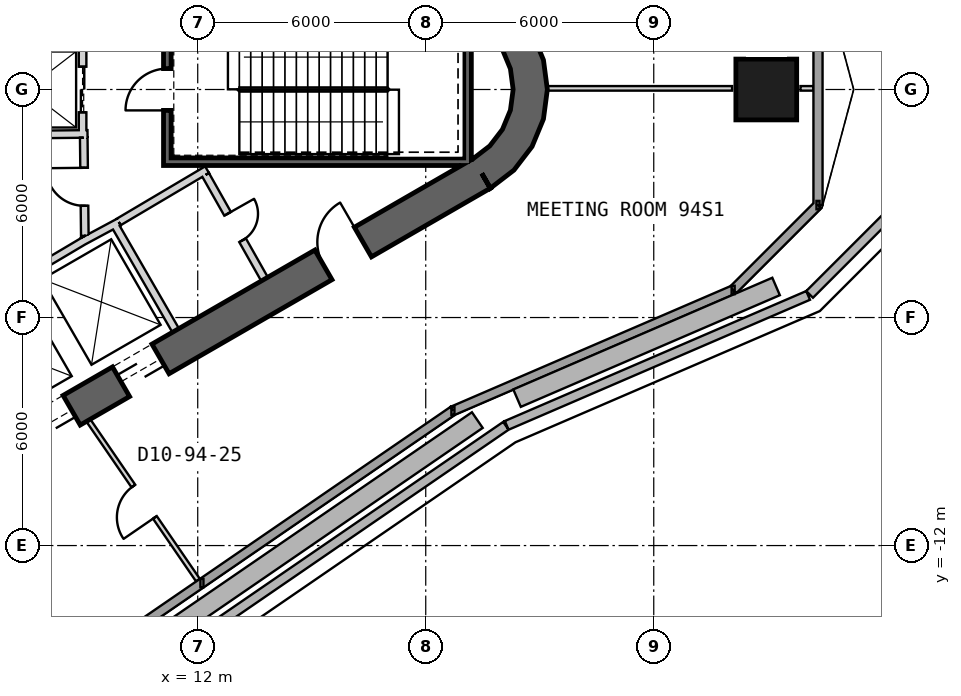
"""IFC4 building model, lengths in metres.
Left out: names, types, materials, properties, quantities, classifications, styles, units other than length and angle.
Written with IfcOpenShell. Run it as: python <this file> out.ifc"""

import sys

from ifc_helpers import new_model, si_unit, direction, frame, frame_2d, origin, origin_2d, place, context, subcontext, project, spatial, polyline, rectangle, outline, extrude, element, fill, save


model = new_model("IFC4")
c1 = context("Model", 3, precision=1e-05, world=origin(), true_north=direction((0.0, 1.0)))
c2 = subcontext(c1, "Body", "Model", "MODEL_VIEW")
j1 = project(units=[si_unit("LENGTHUNIT", "METRE"), si_unit("PLANEANGLEUNIT", "RADIAN")], contexts=[c1])
p1 = place(None, origin())
s1 = spatial("IfcSite", under=j1, at=p1, CompositionType="ELEMENT")
p2 = place(p1, origin())
s2 = spatial("IfcBuilding", under=s1, at=p2, CompositionType="ELEMENT")
p3 = place(p2, frame((0.0, 0.0, 415.3)))
s3 = spatial("IfcBuildingStorey", under=s2, at=p3, CompositionType="ELEMENT", Elevation=415.3)
p4 = place(p3, frame((26.961, 0.0, -0.25), z_axis=(0.0, 0.0, 1.0), x_axis=(1.0, 0.0, 0.0)))
e1 = element("IfcColumn", 1, at=p4, inside=s3, PredefinedType="COLUMN", context=c2, shape_type="SweptSolid", body=[
    extrude(rectangle(XDim=1.6, YDim=1.6, at=origin_2d()), origin(), (0.0, 0.0, 1.0), 5.0),
])
p5 = place(p3, frame((-7.825, -17.97, 0.0), z_axis=(0.0, 0.0, 1.0), x_axis=(0.866028369851, 0.499994862586, 0.0)))
e2 = element("IfcWall", 2, at=p5, inside=s3, PredefinedType="SHEAR", context=c2, shape_type="SweptSolid", body=[
    extrude(rectangle(XDim=31.523, YDim=0.9, at=frame_2d((15.762, 0.0))), origin(), (0.0, 0.0, 1.0), 5.0),
])
p6 = place(p5, frame((17.862, 0.0, 0.0)))
e3 = element("IfcOpeningElement", 3, at=p6, cuts=e2, PredefinedType="OPENING", context=c2, shape_type="SweptSolid", body=[
    extrude(rectangle(XDim=1.2, YDim=2.4, at=frame_2d((0.6, 1.2))), frame((0.0, 0.46, 0.0), z_axis=(0.0, -1.0, 0.0), x_axis=(1.0, 0.0, 0.0)), (0.0, 0.0, 1.0), 0.92),
])
p7 = place(p5, frame((20.562, 0.0, 0.0)))
e4 = element("IfcOpeningElement", 4, at=p7, cuts=e2, PredefinedType="OPENING", context=c2, shape_type="SweptSolid", body=[
    extrude(rectangle(XDim=1.2, YDim=2.4, at=frame_2d((0.6, 1.2))), frame((0.0, 0.46, 0.0), z_axis=(0.0, -1.0, 0.0), x_axis=(1.0, 0.0, 0.0)), (0.0, 0.0, 1.0), 0.92),
])
p8 = place(p5, frame((26.712, 0.0, 0.0)))
e5 = element("IfcOpeningElement", 5, at=p8, cuts=e2, PredefinedType="OPENING", context=c2, shape_type="SweptSolid", body=[
    extrude(rectangle(XDim=1.2, YDim=2.4, at=frame_2d((0.6, 1.2))), frame((0.0, 0.46, 0.0), z_axis=(0.0, -1.0, 0.0), x_axis=(1.0, 0.0, 0.0)), (0.0, 0.0, 1.0), 0.92),
])
p9 = place(p5, frame((3.612, 0.0, 0.0)))
e6 = element("IfcOpeningElement", 6, at=p9, cuts=e2, PredefinedType="OPENING", context=c2, shape_type="SweptSolid", body=[
    extrude(rectangle(XDim=1.2, YDim=2.4, at=frame_2d((0.6, 1.2))), frame((0.0, 0.46, 0.0), z_axis=(0.0, -1.0, 0.0), x_axis=(1.0, 0.0, 0.0)), (0.0, 0.0, 1.0), 0.92),
])
p10 = place(p3, origin())
e7 = element("IfcWall", 7, at=p10, inside=s3, PredefinedType="SHEAR", context=c2, shape_type="SweptSolid", body=[
    extrude(outline(polyline([(19.7, -2.598), (20.321, -2.121), (20.798, -1.5), (21.098, -0.777), (21.2, 0.0), (21.098, 0.777), (20.798, 1.5), (20.321, 2.121), (19.7, 2.598), (19.25, 1.819), (19.685, 1.485), (20.019, 1.05), (20.229, 0.543), (20.3, 0.0), (20.229, -0.543), (20.019, -1.05), (19.685, -1.485), (19.25, -1.819), (19.7, -2.598)])), origin(), (0.0, 0.0, 1.0), 5.0),
])
p11 = place(p3, frame((-1.098, -22.052, 0.0), z_axis=(0.0, 0.0, 1.0), x_axis=(0.824476827337, 0.565895715821, 0.0)))
e8 = element("IfcWall", 8, at=p11, inside=s3, PredefinedType="SOLIDWALL", context=c2, shape_type="SweptSolid", body=[
    extrude(rectangle(XDim=24.031, YDim=0.24, at=frame_2d((12.016, 0.0))), origin(), (0.0, 0.0, 1.0), 4.75),
])
p12 = place(p3, frame((18.716, -8.453, 0.0), z_axis=(0.0, 0.0, 1.0), x_axis=(0.91830312374, 0.395877977323, 0.0)))
e9 = element("IfcWall", 9, at=p12, inside=s3, PredefinedType="SOLIDWALL", context=c2, shape_type="SweptSolid", body=[
    extrude(rectangle(XDim=8.03, YDim=0.24, at=frame_2d((4.015, 0.0))), origin(), (0.0, 0.0, 1.0), 4.75),
])
p13 = place(p3, frame((26.089, -5.274, 0.0), z_axis=(0.0, 0.0, 1.0), x_axis=(0.707106781187, 0.707106781187, 0.0)))
e10 = element("IfcWall", 10, at=p13, inside=s3, PredefinedType="SOLIDWALL", context=c2, shape_type="SweptSolid", body=[
    extrude(rectangle(XDim=3.158, YDim=0.24, at=frame_2d((1.579, 0.0))), origin(), (0.0, 0.0, 1.0), 4.75),
])
p14 = place(p3, frame((28.322, -3.041, 0.0), z_axis=(0.0, 0.0, 1.0), x_axis=(0.0, 1.0, 0.0)))
e11 = element("IfcWall", 11, at=p14, inside=s3, PredefinedType="SOLIDWALL", context=c2, shape_type="SweptSolid", body=[
    extrude(rectangle(XDim=6.083, YDim=0.24, at=frame_2d((3.041, 0.0))), origin(), (0.0, 0.0, 1.0), 4.75),
])
p15 = place(p3, frame((30.362, -3.131, 0.04), z_axis=(0.0, 0.0, 1.0), x_axis=(-0.707144954684, -0.707068605628, 0.0)))
e12 = element("IfcWall", 12, at=p15, inside=s3, PredefinedType="PARAPET", context=c2, shape_type="SweptSolid", body=[
    extrude(rectangle(XDim=3.198, YDim=0.25, at=frame_2d((1.599, 0.0))), origin(), (0.0, 0.0, 1.0), 1.2),
])
p16 = place(p3, frame((28.062, -5.418, 0.04), z_axis=(0.0, 0.0, 1.0), x_axis=(-0.918306725868, -0.395869621499, 0.0)))
e13 = element("IfcWall", 13, at=p16, inside=s3, PredefinedType="PARAPET", context=c2, shape_type="SweptSolid", body=[
    extrude(rectangle(XDim=8.638, YDim=0.25, at=frame_2d((4.319, 0.0))), origin(), (0.0, 0.0, 1.0), 1.2),
])
p17 = place(p3, frame((20.109, -8.849, 0.04), z_axis=(0.0, 0.0, 1.0), x_axis=(-0.824476642241, -0.565895985494, 0.0)))
e14 = element("IfcWall", 14, at=p17, inside=s3, PredefinedType="PARAPET", context=c2, shape_type="SweptSolid", body=[
    extrude(rectangle(XDim=26.04, YDim=0.25, at=frame_2d((13.02, 0.0))), origin(), (0.0, 0.0, 1.0), 1.2),
])
p18 = place(p3, frame((27.219, -5.183, 0.04), z_axis=(0.0, 0.0, 1.0), x_axis=(-0.918307593702, -0.39586760836, 0.0)))
e15 = element("IfcWall", 15, at=p18, inside=s3, PredefinedType="PARAPET", context=c2, shape_type="SweptSolid", body=[
    extrude(rectangle(XDim=7.422, YDim=0.5, at=frame_2d((3.711, 0.0))), origin(), (0.0, 0.0, 1.0), 0.6),
])
p19 = place(p3, frame((19.357, -8.698, 0.04), z_axis=(0.0, 0.0, 1.0), x_axis=(-0.824477152259, -0.565895242428, 0.0)))
e16 = element("IfcWall", 16, at=p19, inside=s3, PredefinedType="PARAPET", context=c2, shape_type="SweptSolid", body=[
    extrude(rectangle(XDim=24.864, YDim=0.5, at=frame_2d((12.432, 0.0))), origin(), (0.0, 0.0, 1.0), 0.6),
])
p20 = place(p3, frame((9.795, -3.525, 0.0), z_axis=(0.0, 0.0, 1.0), x_axis=(0.499984717929, -0.866034226713, 0.0)))
e17 = element("IfcWall", 17, at=p20, inside=s3, PredefinedType="PLUMBINGWALL", context=c2, shape_type="SweptSolid", body=[
    extrude(rectangle(XDim=3.25, YDim=0.2, at=frame_2d((1.625, 0.0))), origin(), (0.0, 0.0, 1.0), 4.75),
])
p21 = place(p3, frame((8.974, -3.999, 0.0), z_axis=(0.0, 0.0, 1.0), x_axis=(0.880907015104, 0.473289373154, 0.0)))
e18 = element("IfcWall", 18, at=p21, inside=s3, PredefinedType="PLUMBINGWALL", context=c2, shape_type="SweptSolid", body=[
    extrude(rectangle(XDim=1.078, YDim=0.2, at=frame_2d((0.539, 0.0))), origin(), (0.0, 0.0, 1.0), 4.75),
])
p22 = place(p3, frame((7.493, -4.878, 0.0), z_axis=(0.0, 0.0, 1.0), x_axis=(0.859981807212, 0.510324691999, 0.0)))
e19 = element("IfcWall", 19, at=p22, inside=s3, PredefinedType="PLUMBINGWALL", context=c2, shape_type="SweptSolid", body=[
    extrude(rectangle(XDim=1.845, YDim=0.2, at=frame_2d((0.922, 0.0))), origin(), (0.0, 0.0, 1.0), 4.75),
])
p23 = place(p3, frame((19.1, -2.0, -0.25), z_axis=(0.0, 0.0, 1.0), x_axis=(0.0, 1.0, 0.0)))
e20 = element("IfcWall", 20, at=p23, inside=s3, PredefinedType="SHEAR", context=c2, shape_type="SweptSolid", body=[
    extrude(rectangle(XDim=3.8, YDim=0.2, at=frame_2d((1.9, 0.0))), origin(), (0.0, 0.0, 1.0), 5.0),
])
p24 = place(p3, frame((11.1, -1.9, -0.25), z_axis=(0.0, 0.0, 1.0), x_axis=(1.0, 0.0, 0.0)))
e21 = element("IfcWall", 21, at=p24, inside=s3, PredefinedType="SHEAR", context=c2, shape_type="SweptSolid", body=[
    extrude(rectangle(XDim=7.9, YDim=0.2, at=frame_2d((3.95, 0.0))), origin(), (0.0, 0.0, 1.0), 5.0),
])
p25 = place(p3, frame((11.2, -1.8, -0.25), z_axis=(0.0, 0.0, 1.0), x_axis=(0.0, 1.0, 0.0)))
e22 = element("IfcWall", 22, at=p25, inside=s3, PredefinedType="SHEAR", context=c2, shape_type="SweptSolid", body=[
    extrude(rectangle(XDim=3.6, YDim=0.2, at=frame_2d((1.8, 0.0))), origin(), (0.0, 0.0, 1.0), 5.0),
])
p26 = place(p25, frame((1.25, 0.0, 0.25)))
e23 = element("IfcOpeningElement", 23, at=p26, cuts=e22, PredefinedType="OPENING", context=c2, shape_type="SweptSolid", body=[
    extrude(rectangle(XDim=1.1, YDim=2.1, at=frame_2d((0.55, 1.05))), frame((0.0, 0.11, 0.0), z_axis=(0.0, -1.0, 0.0), x_axis=(1.0, 0.0, 0.0)), (0.0, 0.0, 1.0), 0.22),
])
p27 = place(p3, frame((8.97, 1.2, 0.0), z_axis=(0.0, 0.0, 1.0), x_axis=(0.0, -1.0, 0.0)))
e24 = element("IfcWall", 24, at=p27, inside=s3, PredefinedType="PLUMBINGWALL", context=c2, shape_type="SweptSolid", body=[
    extrude(rectangle(XDim=2.4, YDim=0.2, at=frame_2d((1.2, 0.0))), origin(), (0.0, 0.0, 1.0), 4.75),
])
p28 = place(p27, frame((0.6, 0.0, 0.0)))
e25 = element("IfcOpeningElement", 25, at=p28, cuts=e24, PredefinedType="OPENING", context=c2, shape_type="SweptSolid", body=[
    extrude(rectangle(XDim=1.2, YDim=2.4, at=frame_2d((0.6, 1.2))), frame((0.0, 0.11, 0.0), z_axis=(0.0, -1.0, 0.0), x_axis=(1.0, 0.0, 0.0)), (0.0, 0.0, 1.0), 0.22),
])
p29 = place(p3, frame((5.9, -1.201, 0.0), z_axis=(0.0, 0.0, 1.0), x_axis=(0.999950064753, 0.009993397809, 0.0)))
e26 = element("IfcWall", 26, at=p29, inside=s3, PredefinedType="PLUMBINGWALL", context=c2, shape_type="SweptSolid", body=[
    extrude(rectangle(XDim=3.2, YDim=0.2, at=frame_2d((1.6, 0.0))), origin(), (0.0, 0.0, 1.0), 4.75),
])
p30 = place(p3, frame((12.245, -2.109, 0.0), z_axis=(0.0, 0.0, 1.0), x_axis=(-0.860414880418, -0.509594185166, 0.0)))
e27 = element("IfcWall", 27, at=p30, inside=s3, PredefinedType="PARTITIONING", context=c2, shape_type="SweptSolid", body=[
    extrude(rectangle(XDim=2.7, YDim=0.2, at=frame_2d((1.35, 0.0))), origin(), (0.0, 0.0, 1.0), 4.75),
])
p31 = place(p3, frame((13.758, -4.99, 0.0), z_axis=(0.0, 0.0, 1.0), x_axis=(-0.491993409184, 0.87059892334, 0.0)))
e28 = element("IfcWall", 28, at=p31, inside=s3, PredefinedType="PARTITIONING", context=c2, shape_type="SweptSolid", body=[
    extrude(rectangle(XDim=3.15, YDim=0.2, at=frame_2d((1.575, 0.0))), origin(), (0.0, 0.0, 1.0), 4.75),
])
p32 = place(p31, frame((1.175, 0.0, 0.0)))
e29 = element("IfcOpeningElement", 29, at=p32, cuts=e28, PredefinedType="OPENING", context=c2, shape_type="SweptSolid", body=[
    extrude(rectangle(XDim=0.8, YDim=2.1, at=frame_2d((0.4, 1.05))), frame((0.0, 0.11, 0.0), z_axis=(0.0, -1.0, 0.0), x_axis=(1.0, 0.0, 0.0)), (0.0, 0.0, 1.0), 0.22),
])
p33 = place(p3, frame((9.029, -3.851, 0.0), z_axis=(0.0, 0.0, 1.0), x_axis=(-0.010783593937, 0.99994185536, 0.0)))
e30 = element("IfcWall", 30, at=p33, inside=s3, PredefinedType="PARTITIONING", context=c2, shape_type="SweptSolid", body=[
    extrude(rectangle(XDim=2.581, YDim=0.2, at=frame_2d((1.291, 0.0))), origin(), (0.0, 0.0, 1.0), 4.75),
])
p34 = place(p33, frame((0.791, 0.0, 0.0)))
e31 = element("IfcOpeningElement", 31, at=p34, cuts=e30, PredefinedType="OPENING", context=c2, shape_type="SweptSolid", body=[
    extrude(rectangle(XDim=1.0, YDim=2.1, at=frame_2d((0.5, 1.05))), frame((0.0, 0.11, 0.0), z_axis=(0.0, -1.0, 0.0), x_axis=(1.0, 0.0, 0.0)), (0.0, 0.0, 1.0), 0.22),
])
p35 = place(p3, frame((21.046, 0.03, 0.0), z_axis=(0.0, 0.0, 1.0), x_axis=(1.0, 0.0, 0.0)))
e32 = element("IfcWall", 32, at=p35, inside=s3, PredefinedType="PARTITIONING", context=c2, shape_type="SweptSolid", body=[
    extrude(rectangle(XDim=5.015, YDim=0.12, at=frame_2d((2.507, 0.0))), origin(), (0.0, 0.0, 1.0), 2.52),
])
p36 = place(p3, frame((27.861, 0.03, 0.0), z_axis=(0.0, 0.0, 1.0), x_axis=(1.0, 0.0, 0.0)))
e33 = element("IfcWall", 33, at=p36, inside=s3, PredefinedType="PARTITIONING", context=c2, shape_type="SweptSolid", body=[
    extrude(rectangle(XDim=0.341, YDim=0.12, at=frame_2d((0.17, 0.0))), origin(), (0.0, 0.0, 1.0), 4.75),
])
p37 = place(p3, frame((12.004, -12.907, 0.0), z_axis=(0.0, 0.0, 1.0), x_axis=(-0.565849521663, 0.824508531693, 0.0)))
e34 = element("IfcWall", 34, at=p37, inside=s3, PredefinedType="PARTITIONING", context=c2, shape_type="SweptSolid", body=[
    extrude(rectangle(XDim=5.096, YDim=0.12, at=frame_2d((2.548, 0.0))), origin(), (0.0, 0.0, 1.0), 4.75),
])
p38 = place(p37, frame((2.0, 0.0, 0.0)))
e35 = element("IfcOpeningElement", 35, at=p38, cuts=e34, PredefinedType="OPENING", context=c2, shape_type="SweptSolid", body=[
    extrude(rectangle(XDim=1.0, YDim=2.1, at=frame_2d((0.5, 1.05))), frame((0.0, 0.07, 0.0), z_axis=(0.0, -1.0, 0.0), x_axis=(1.0, 0.0, 0.0)), (0.0, 0.0, 1.0), 0.14),
])
p39 = place(p26, origin())
e36 = element("IfcDoor", 36, at=p39, inside=s3, OperationType="SINGLE_SWING_LEFT", PredefinedType="USERDEFINED", context=c2, shape_type="SweptSolid", body=[
    extrude(rectangle(XDim=1.1, YDim=2.1, at=frame_2d((0.55, 1.05))), frame((0.0, 0.025, 0.0), z_axis=(0.0, -1.0, 0.0), x_axis=(1.0, 0.0, 0.0)), (0.0, 0.0, 1.0), 0.05),
])
fill(e23, e36)
p40 = place(p34, origin())
e37 = element("IfcDoor", 37, at=p40, inside=s3, OperationType="SINGLE_SWING_RIGHT", PredefinedType="USERDEFINED", context=c2, shape_type="SweptSolid", body=[
    extrude(rectangle(XDim=1.0, YDim=2.1, at=frame_2d((0.5, 1.05))), frame((0.0, 0.025, 0.0), z_axis=(0.0, -1.0, 0.0), x_axis=(1.0, 0.0, 0.0)), (0.0, 0.0, 1.0), 0.05),
])
fill(e31, e37)
p41 = place(p28, origin())
e38 = element("IfcDoor", 38, at=p41, inside=s3, OperationType="SLIDING_TO_LEFT", PredefinedType="USERDEFINED", context=c2, shape_type="SweptSolid", body=[
    extrude(rectangle(XDim=1.2, YDim=2.4, at=frame_2d((0.6, 1.2))), frame((0.0, 0.025, 0.0), z_axis=(0.0, -1.0, 0.0), x_axis=(1.0, 0.0, 0.0)), (0.0, 0.0, 1.0), 0.05),
])
fill(e25, e38)
p42 = place(p32, origin())
e39 = element("IfcDoor", 39, at=p42, inside=s3, OperationType="SINGLE_SWING_RIGHT", PredefinedType="USERDEFINED", context=c2, shape_type="SweptSolid", body=[
    extrude(rectangle(XDim=0.8, YDim=2.1, at=frame_2d((0.4, 1.05))), frame((0.0, 0.025, 0.0), z_axis=(0.0, -1.0, 0.0), x_axis=(1.0, 0.0, 0.0)), (0.0, 0.0, 1.0), 0.05),
])
fill(e29, e39)
p43 = place(p38, origin())
e40 = element("IfcDoor", 40, at=p43, inside=s3, OperationType="SINGLE_SWING_LEFT", PredefinedType="NOTDEFINED", context=c2, shape_type="SweptSolid", body=[
    extrude(rectangle(XDim=1.0, YDim=2.1, at=frame_2d((0.5, 1.05))), frame((0.0, 0.025, 0.0), z_axis=(0.0, -1.0, 0.0), x_axis=(1.0, 0.0, 0.0)), (0.0, 0.0, 1.0), 0.05),
])
fill(e35, e40)
p44 = place(p6, origin())
e41 = element("IfcDoor", 41, at=p44, inside=s3, OperationType="SLIDING_TO_LEFT", PredefinedType="USERDEFINED", context=c2, shape_type="SweptSolid", body=[
    extrude(rectangle(XDim=1.2, YDim=2.4, at=frame_2d((0.6, 1.2))), frame((0.0, 0.025, 0.0), z_axis=(0.0, -1.0, 0.0), x_axis=(1.0, 0.0, 0.0)), (0.0, 0.0, 1.0), 0.05),
])
fill(e3, e41)
p45 = place(p7, origin())
e42 = element("IfcDoor", 42, at=p45, inside=s3, OperationType="SLIDING_TO_LEFT", PredefinedType="USERDEFINED", context=c2, shape_type="SweptSolid", body=[
    extrude(rectangle(XDim=1.2, YDim=2.4, at=frame_2d((0.6, 1.2))), frame((0.0, 0.025, 0.0), z_axis=(0.0, -1.0, 0.0), x_axis=(1.0, 0.0, 0.0)), (0.0, 0.0, 1.0), 0.05),
])
fill(e4, e42)
p46 = place(p8, origin())
e43 = element("IfcDoor", 43, at=p46, inside=s3, OperationType="SINGLE_SWING_RIGHT", PredefinedType="USERDEFINED", context=c2, shape_type="SweptSolid", body=[
    extrude(rectangle(XDim=1.2, YDim=2.4, at=frame_2d((0.6, 1.2))), frame((0.0, 0.025, 0.0), z_axis=(0.0, -1.0, 0.0), x_axis=(1.0, 0.0, 0.0)), (0.0, 0.0, 1.0), 0.05),
])
fill(e5, e43)
save(model, sys.argv[1])
